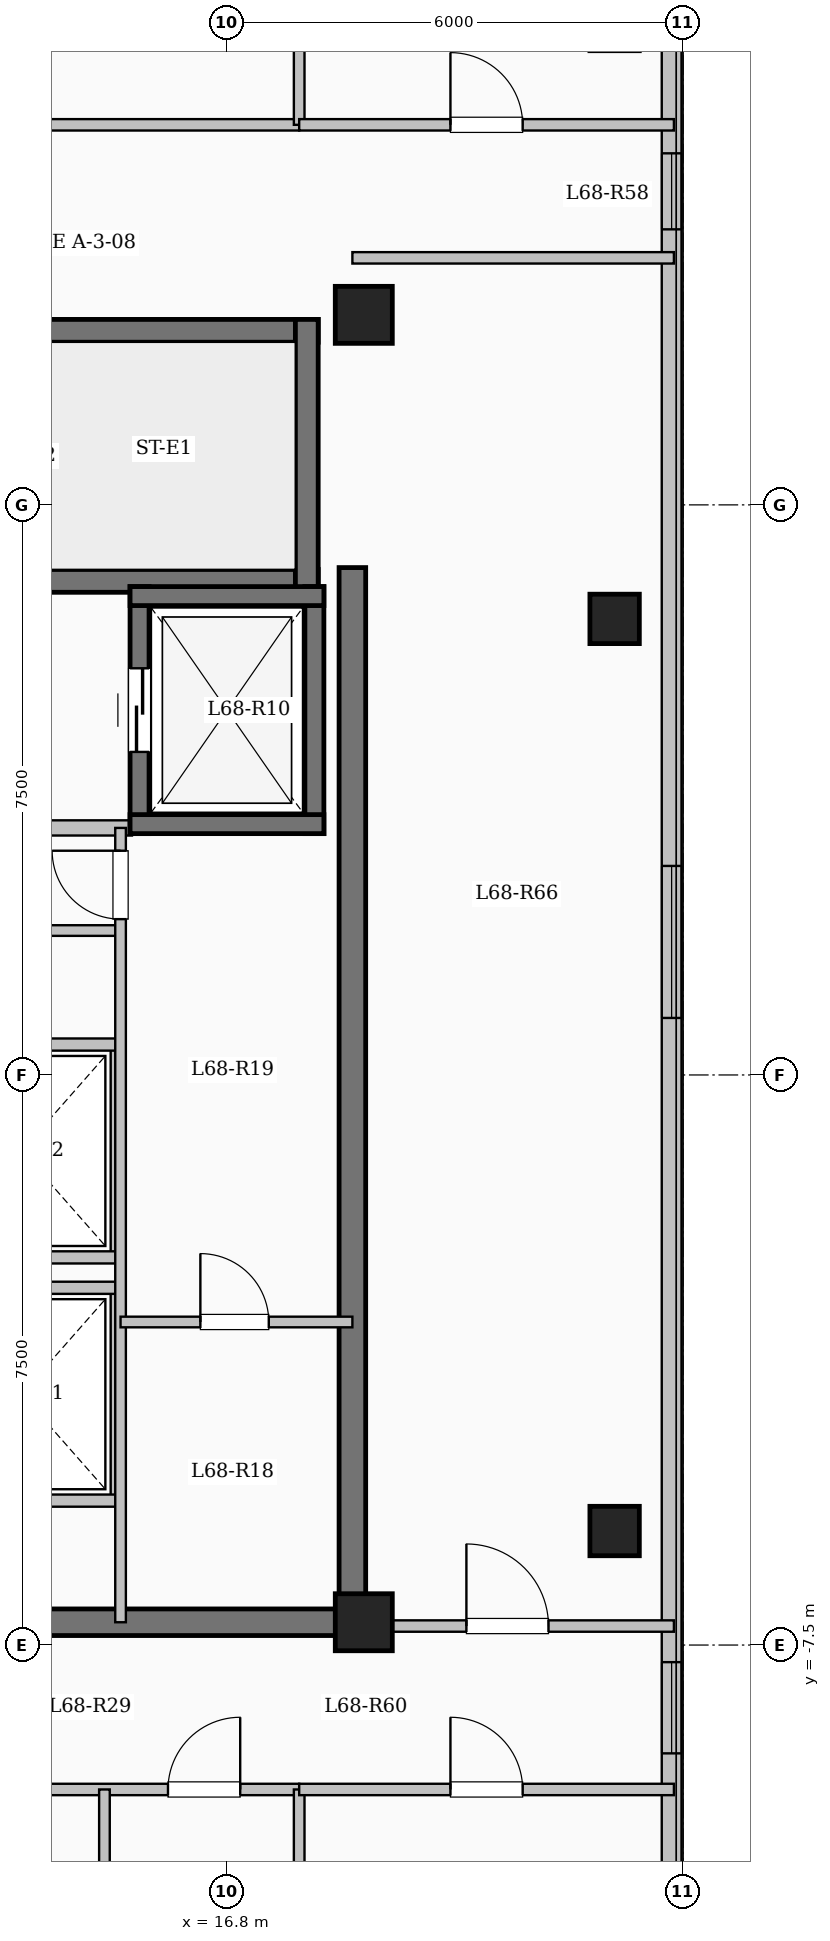
"""IFC4 building model, lengths in metres.
Left out: names, types, materials, properties, quantities, classifications, styles, units other than length and angle.
Written with IfcOpenShell. Run it as: python <this file> out.ifc"""

import sys

from ifc_helpers import new_model, si_unit, direction, frame, frame_2d, origin, origin_2d, place, context, subcontext, project, spatial, rectangle, extrude, element, fill, save


model = new_model("IFC4")
c1 = context("Model", 3, precision=1e-05, world=origin(), true_north=direction((0.0, 1.0)))
c2 = subcontext(c1, "Body", "Model", "MODEL_VIEW")
j1 = project(units=[si_unit("LENGTHUNIT", "METRE"), si_unit("PLANEANGLEUNIT", "RADIAN")], contexts=[c1])
p1 = place(None, origin())
s1 = spatial("IfcSite", under=j1, at=p1, CompositionType="ELEMENT")
p2 = place(p1, origin())
s2 = spatial("IfcBuilding", under=s1, at=p2, CompositionType="ELEMENT")
p3 = place(p2, frame((0.0, 0.0, 251.55)))
s3 = spatial("IfcBuildingStorey", under=s2, at=p3, CompositionType="ELEMENT", Elevation=251.55)
for number, where, z_axis, x_axis in (
    (1, (18.6, -7.2, 0.0), (0.0, 0.0, 1.0), (1.0, 0.0, 0.0)),
    (2, (18.6, 10.0, 0.0), (0.0, 0.0, 1.0), (1.0, 0.0, 0.0)),
):
    element("IfcColumn", number, at=place(p3, frame(where, z_axis=z_axis, x_axis=x_axis)), inside=s3, PredefinedType="COLUMN", context=c2, shape_type="SweptSolid", body=[
        extrude(rectangle(XDim=0.75, YDim=0.75, at=origin_2d()), origin(), (0.0, 0.0, 1.0), 3.35),
    ])
for number, where, z_axis, x_axis in (
    (3, (21.9, -6.0, 0.0), (0.0, 0.0, 1.0), (1.0, 0.0, 0.0)),
    (4, (21.9, 6.0, 0.0), (0.0, 0.0, 1.0), (1.0, 0.0, 0.0)),
):
    element("IfcColumn", number, at=place(p3, frame(where, z_axis=z_axis, x_axis=x_axis)), inside=s3, PredefinedType="COLUMN", context=c2, shape_type="SweptSolid", body=[
        extrude(rectangle(XDim=0.65, YDim=0.65, at=origin_2d()), origin(), (0.0, 0.0, 1.0), 3.35),
    ])
p4 = place(p3, frame((22.65, 17.55, 0.0), z_axis=(0.0, 0.0, 1.0), x_axis=(0.0, -1.0, 0.0)))
e5 = element("IfcWall", 5, at=p4, inside=s3, PredefinedType="SOLIDWALL", context=c2, shape_type="SweptSolid", body=[
    extrude(rectangle(XDim=35.1, YDim=0.26, at=frame_2d((17.55, 0.0))), origin(), (0.0, 0.0, 1.0), 3.1),
])
p5 = place(p4, frame((1.525, 0.0, 0.9)))
e6 = element("IfcOpeningElement", 6, at=p5, cuts=e5, PredefinedType="OPENING", context=c2, shape_type="SweptSolid", body=[
    extrude(rectangle(XDim=2.0, YDim=1.7, at=frame_2d((1.0, 0.85))), frame((0.0, 0.14, 0.0), z_axis=(0.0, -1.0, 0.0), x_axis=(1.0, 0.0, 0.0)), (0.0, 0.0, 1.0), 0.28),
])
p6 = place(p4, frame((5.425, 0.0, 0.95)))
e7 = element("IfcOpeningElement", 7, at=p6, cuts=e5, PredefinedType="OPENING", context=c2, shape_type="SweptSolid", body=[
    extrude(rectangle(XDim=1.0, YDim=1.5, at=frame_2d((0.5, 0.75))), frame((0.0, 0.14, 0.0), z_axis=(0.0, -1.0, 0.0), x_axis=(1.0, 0.0, 0.0)), (0.0, 0.0, 1.0), 0.28),
])
p7 = place(p4, frame((14.8, 0.0, 0.9)))
e8 = element("IfcOpeningElement", 8, at=p7, cuts=e5, PredefinedType="OPENING", context=c2, shape_type="SweptSolid", body=[
    extrude(rectangle(XDim=2.0, YDim=1.7, at=frame_2d((1.0, 0.85))), frame((0.0, 0.14, 0.0), z_axis=(0.0, -1.0, 0.0), x_axis=(1.0, 0.0, 0.0)), (0.0, 0.0, 1.0), 0.28),
])
p8 = place(p4, frame((25.275, 0.0, 0.95)))
e9 = element("IfcOpeningElement", 9, at=p8, cuts=e5, PredefinedType="OPENING", context=c2, shape_type="SweptSolid", body=[
    extrude(rectangle(XDim=1.2, YDim=1.5, at=frame_2d((0.6, 0.75))), frame((0.0, 0.14, 0.0), z_axis=(0.0, -1.0, 0.0), x_axis=(1.0, 0.0, 0.0)), (0.0, 0.0, 1.0), 0.28),
])
p9 = place(p4, frame((29.925, 0.0, 0.9)))
e10 = element("IfcOpeningElement", 10, at=p9, cuts=e5, PredefinedType="OPENING", context=c2, shape_type="SweptSolid", body=[
    extrude(rectangle(XDim=2.2, YDim=1.75, at=frame_2d((1.1, 0.875))), frame((0.0, 0.14, 0.0), z_axis=(0.0, -1.0, 0.0), x_axis=(1.0, 0.0, 0.0)), (0.0, 0.0, 1.0), 0.28),
])
p10 = place(p3, frame((10.0, 9.79, 0.0), z_axis=(0.0, 0.0, 1.0), x_axis=(1.0, 0.0, 0.0)))
e11 = element("IfcWall", 11, at=p10, inside=s3, PredefinedType="SHEAR", context=c2, shape_type="SweptSolid", body=[
    extrude(rectangle(XDim=8.0, YDim=0.3, at=frame_2d((4.0, 0.0))), origin(), (0.0, 0.0, 1.0), 3.35),
])
p11 = place(p3, frame((10.0, 6.5, 0.0), z_axis=(0.0, 0.0, 1.0), x_axis=(1.0, 0.0, 0.0)))
e12 = element("IfcWall", 12, at=p11, inside=s3, PredefinedType="SHEAR", context=c2, shape_type="SweptSolid", body=[
    extrude(rectangle(XDim=8.0, YDim=0.3, at=frame_2d((4.0, 0.0))), origin(), (0.0, 0.0, 1.0), 3.35),
])
p12 = place(p11, frame((0.55, 0.0, 0.0)))
e13 = element("IfcOpeningElement", 13, at=p12, cuts=e12, PredefinedType="OPENING", context=c2, shape_type="SweptSolid", body=[
    extrude(rectangle(XDim=1.0, YDim=2.15, at=frame_2d((0.5, 1.075))), frame((0.0, 0.16, 0.0), z_axis=(0.0, -1.0, 0.0), x_axis=(1.0, 0.0, 0.0)), (0.0, 0.0, 1.0), 0.32),
])
p13 = place(p3, frame((17.85, 6.35, 0.0), z_axis=(0.0, 0.0, 1.0), x_axis=(0.0, 1.0, 0.0)))
e14 = element("IfcWall", 14, at=p13, inside=s3, PredefinedType="SHEAR", context=c2, shape_type="SweptSolid", body=[
    extrude(rectangle(XDim=3.59, YDim=0.3, at=frame_2d((1.795, 0.0))), origin(), (0.0, 0.0, 1.0), 3.35),
])
p14 = place(p3, frame((10.15, 3.25, 0.0), z_axis=(0.0, 0.0, 1.0), x_axis=(1.0, 0.0, 0.0)))
e15 = element("IfcWall", 15, at=p14, inside=s3, PredefinedType="SOLIDWALL", context=c2, shape_type="SweptSolid", body=[
    extrude(rectangle(XDim=5.4, YDim=0.2, at=frame_2d((2.7, 0.0))), origin(), (0.0, 0.0, 1.0), 3.1),
])
p15 = place(p3, frame((15.65, 3.175, 0.0), z_axis=(0.0, 0.0, 1.0), x_axis=(0.0, 1.0, 0.0)))
e16 = element("IfcWall", 16, at=p15, inside=s3, PredefinedType="SHEAR", context=c2, shape_type="SweptSolid", body=[
    extrude(rectangle(XDim=3.25, YDim=0.25, at=frame_2d((1.625, 0.0))), origin(), (0.0, 0.0, 1.0), 3.35),
])
p16 = place(p15, frame((1.075, 0.0, 0.0)))
e17 = element("IfcOpeningElement", 17, at=p16, cuts=e16, PredefinedType="OPENING", context=c2, shape_type="SweptSolid", body=[
    extrude(rectangle(XDim=1.1, YDim=2.15, at=frame_2d((0.55, 1.075))), frame((0.0, 0.135, 0.0), z_axis=(0.0, -1.0, 0.0), x_axis=(1.0, 0.0, 0.0)), (0.0, 0.0, 1.0), 0.27),
])
p17 = place(p3, frame((17.95, 3.175, 0.0), z_axis=(0.0, 0.0, 1.0), x_axis=(0.0, 1.0, 0.0)))
e18 = element("IfcWall", 18, at=p17, inside=s3, PredefinedType="SHEAR", context=c2, shape_type="SweptSolid", body=[
    extrude(rectangle(XDim=3.25, YDim=0.25, at=frame_2d((1.625, 0.0))), origin(), (0.0, 0.0, 1.0), 3.35),
])
for number, where, z_axis, x_axis in (
    (19, (15.525, 3.3, 0.0), (0.0, 0.0, 1.0), (1.0, 0.0, 0.0)),
    (20, (15.525, 6.3, 0.0), (0.0, 0.0, 1.0), (1.0, 0.0, 0.0)),
):
    element("IfcWall", number, at=place(p3, frame(where, z_axis=z_axis, x_axis=x_axis)), inside=s3, PredefinedType="SHEAR", context=c2, shape_type="SweptSolid", body=[
        extrude(rectangle(XDim=2.55, YDim=0.25, at=frame_2d((1.275, 0.0))), origin(), (0.0, 0.0, 1.0), 3.35),
    ])
p18 = place(p3, frame((15.35, -5.6, 0.0), z_axis=(0.0, 0.0, 1.0), x_axis=(0.0, 1.0, 0.0)))
e21 = element("IfcWall", 21, at=p18, inside=s3, PredefinedType="SOLIDWALL", context=c2, shape_type="SweptSolid", body=[
    extrude(rectangle(XDim=2.8, YDim=0.16, at=frame_2d((1.4, 0.0))), origin(), (0.0, 0.0, 1.0), 3.1),
])
for number, where, z_axis, x_axis in (
    (22, (12.85, -5.6, 0.0), (0.0, 0.0, 1.0), (1.0, 0.0, 0.0)),
    (23, (12.85, -2.8, 0.0), (0.0, 0.0, 1.0), (1.0, 0.0, 0.0)),
):
    element("IfcWall", number, at=place(p3, frame(where, z_axis=z_axis, x_axis=x_axis)), inside=s3, PredefinedType="SOLIDWALL", context=c2, shape_type="SweptSolid", body=[
        extrude(rectangle(XDim=2.5, YDim=0.16, at=frame_2d((1.25, 0.0))), origin(), (0.0, 0.0, 1.0), 3.1),
    ])
p19 = place(p3, frame((15.35, -2.4, 0.0), z_axis=(0.0, 0.0, 1.0), x_axis=(0.0, 1.0, 0.0)))
e24 = element("IfcWall", 24, at=p19, inside=s3, PredefinedType="SOLIDWALL", context=c2, shape_type="SweptSolid", body=[
    extrude(rectangle(XDim=2.8, YDim=0.16, at=frame_2d((1.4, 0.0))), origin(), (0.0, 0.0, 1.0), 3.1),
])
for number, where, z_axis, x_axis in (
    (25, (12.85, -2.4, 0.0), (0.0, 0.0, 1.0), (1.0, 0.0, 0.0)),
    (26, (12.85, 0.4, 0.0), (0.0, 0.0, 1.0), (1.0, 0.0, 0.0)),
):
    element("IfcWall", number, at=place(p3, frame(where, z_axis=z_axis, x_axis=x_axis)), inside=s3, PredefinedType="SOLIDWALL", context=c2, shape_type="SweptSolid", body=[
        extrude(rectangle(XDim=2.5, YDim=0.16, at=frame_2d((1.25, 0.0))), origin(), (0.0, 0.0, 1.0), 3.1),
    ])
p20 = place(p3, frame((18.45, -7.375, 0.0), z_axis=(0.0, 0.0, 1.0), x_axis=(0.0, 1.0, 0.0)))
e27 = element("IfcWall", 27, at=p20, inside=s3, PredefinedType="SHEAR", context=c2, shape_type="SweptSolid", body=[
    extrude(rectangle(XDim=14.05, YDim=0.35, at=frame_2d((7.025, 0.0))), origin(), (0.0, 0.0, 1.0), 3.35),
])
p21 = place(p3, frame((12.625, -7.2, 0.0), z_axis=(0.0, 0.0, 1.0), x_axis=(1.0, 0.0, 0.0)))
e28 = element("IfcWall", 28, at=p21, inside=s3, PredefinedType="SHEAR", context=c2, shape_type="SweptSolid", body=[
    extrude(rectangle(XDim=6.0, YDim=0.35, at=frame_2d((3.0, 0.0))), origin(), (0.0, 0.0, 1.0), 3.35),
])
p22 = place(p3, frame((12.8, 1.9, 0.0), z_axis=(0.0, 0.0, 1.0), x_axis=(1.0, 0.0, 0.0)))
e29 = element("IfcWall", 29, at=p22, inside=s3, PredefinedType="PARTITIONING", context=c2, shape_type="SweptSolid", body=[
    extrude(rectangle(XDim=2.6, YDim=0.14, at=frame_2d((1.3, 0.0))), origin(), (0.0, 0.0, 1.0), 3.1),
])
p23 = place(p3, frame((15.4, -7.2, 0.0), z_axis=(0.0, 0.0, 1.0), x_axis=(0.0, 1.0, 0.0)))
e30 = element("IfcWall", 30, at=p23, inside=s3, PredefinedType="PARTITIONING", context=c2, shape_type="SweptSolid", body=[
    extrude(rectangle(XDim=10.45, YDim=0.14, at=frame_2d((5.225, 0.0))), origin(), (0.0, 0.0, 1.0), 3.1),
])
p24 = place(p23, frame((9.25, 0.0, 0.0)))
e31 = element("IfcOpeningElement", 31, at=p24, cuts=e30, PredefinedType="OPENING", context=c2, shape_type="SweptSolid", body=[
    extrude(rectangle(XDim=0.9, YDim=2.08, at=frame_2d((0.45, 1.04))), frame((0.0, 0.08, 0.0), z_axis=(0.0, -1.0, 0.0), x_axis=(1.0, 0.0, 0.0)), (0.0, 0.0, 1.0), 0.16),
])
p25 = place(p3, frame((15.4, -3.25, 0.0), z_axis=(0.0, 0.0, 1.0), x_axis=(1.0, 0.0, 0.0)))
e32 = element("IfcWall", 32, at=p25, inside=s3, PredefinedType="PARTITIONING", context=c2, shape_type="SweptSolid", body=[
    extrude(rectangle(XDim=3.05, YDim=0.14, at=frame_2d((1.525, 0.0))), origin(), (0.0, 0.0, 1.0), 3.1),
])
p26 = place(p25, frame((1.05, 0.0, 0.0)))
e33 = element("IfcOpeningElement", 33, at=p26, cuts=e32, PredefinedType="OPENING", context=c2, shape_type="SweptSolid", body=[
    extrude(rectangle(XDim=0.9, YDim=2.08, at=frame_2d((0.45, 1.04))), frame((0.0, 0.08, 0.0), z_axis=(0.0, -1.0, 0.0), x_axis=(1.0, 0.0, 0.0)), (0.0, 0.0, 1.0), 0.16),
])
p27 = place(p3, frame((3.85, 12.5, 0.0), z_axis=(0.0, 0.0, 1.0), x_axis=(1.0, 0.0, 0.0)))
e34 = element("IfcWall", 34, at=p27, inside=s3, PredefinedType="PARTITIONING", context=c2, shape_type="SweptSolid", body=[
    extrude(rectangle(XDim=13.9, YDim=0.15, at=frame_2d((6.95, 0.0))), origin(), (0.0, 0.0, 1.0), 3.1),
])
p28 = place(p27, frame((0.7, 0.0, 0.0)))
e35 = element("IfcOpeningElement", 35, at=p28, cuts=e34, PredefinedType="OPENING", context=c2, shape_type="SweptSolid", body=[
    extrude(rectangle(XDim=0.96, YDim=2.15, at=frame_2d((0.48, 1.075))), frame((0.0, 0.085, 0.0), z_axis=(0.0, -1.0, 0.0), x_axis=(1.0, 0.0, 0.0)), (0.0, 0.0, 1.0), 0.17),
])
p29 = place(p3, frame((8.55, -9.4, 0.0), z_axis=(0.0, 0.0, 1.0), x_axis=(1.0, 0.0, 0.0)))
e36 = element("IfcWall", 36, at=p29, inside=s3, PredefinedType="PARTITIONING", context=c2, shape_type="SweptSolid", body=[
    extrude(rectangle(XDim=9.2, YDim=0.15, at=frame_2d((4.6, 0.0))), origin(), (0.0, 0.0, 1.0), 3.1),
])
p30 = place(p29, frame((1.192, 0.0, 0.0)))
e37 = element("IfcOpeningElement", 37, at=p30, cuts=e36, PredefinedType="OPENING", context=c2, shape_type="SweptSolid", body=[
    extrude(rectangle(XDim=0.95, YDim=2.15, at=frame_2d((0.475, 1.075))), frame((0.0, 0.085, 0.0), z_axis=(0.0, -1.0, 0.0), x_axis=(1.0, 0.0, 0.0)), (0.0, 0.0, 1.0), 0.17),
])
p31 = place(p29, frame((4.516, 0.0, 0.0)))
e38 = element("IfcOpeningElement", 38, at=p31, cuts=e36, PredefinedType="OPENING", context=c2, shape_type="SweptSolid", body=[
    extrude(rectangle(XDim=0.95, YDim=2.15, at=frame_2d((0.475, 1.075))), frame((0.0, 0.085, 0.0), z_axis=(0.0, -1.0, 0.0), x_axis=(1.0, 0.0, 0.0)), (0.0, 0.0, 1.0), 0.17),
])
p32 = place(p29, frame((7.474, 0.0, 0.0)))
e39 = element("IfcOpeningElement", 39, at=p32, cuts=e36, PredefinedType="OPENING", context=c2, shape_type="SweptSolid", body=[
    extrude(rectangle(XDim=0.95, YDim=2.15, at=frame_2d((0.475, 1.075))), frame((0.0, 0.085, 0.0), z_axis=(0.0, -1.0, 0.0), x_axis=(1.0, 0.0, 0.0)), (0.0, 0.0, 1.0), 0.17),
])
p33 = place(p3, frame((15.188, -20.85, 0.0), z_axis=(0.0, 0.0, 1.0), x_axis=(0.0, 1.0, 0.0)))
e40 = element("IfcWall", 40, at=p33, inside=s3, PredefinedType="PARTITIONING", context=c2, shape_type="SweptSolid", body=[
    extrude(rectangle(XDim=11.45, YDim=0.14, at=frame_2d((5.725, 0.0))), origin(), (0.0, 0.0, 1.0), 2.685),
])
p34 = place(p3, frame((18.45, -7.25, 0.0), z_axis=(0.0, 0.0, 1.0), x_axis=(1.0, 0.0, 0.0)))
e41 = element("IfcWall", 41, at=p34, inside=s3, PredefinedType="PARTITIONING", context=c2, shape_type="SweptSolid", body=[
    extrude(rectangle(XDim=4.23, YDim=0.15, at=frame_2d((2.115, 0.0))), origin(), (0.0, 0.0, 1.0), 3.1),
])
p35 = place(p34, frame((1.5, 0.0, 0.0)))
e42 = element("IfcOpeningElement", 42, at=p35, cuts=e41, PredefinedType="OPENING", context=c2, shape_type="SweptSolid", body=[
    extrude(rectangle(XDim=1.08, YDim=2.15, at=frame_2d((0.54, 1.075))), frame((0.0, 0.085, 0.0), z_axis=(0.0, -1.0, 0.0), x_axis=(1.0, 0.0, 0.0)), (0.0, 0.0, 1.0), 0.17),
])
p36 = place(p3, frame((18.45, 10.75, 0.0), z_axis=(0.0, 0.0, 1.0), x_axis=(1.0, 0.0, 0.0)))
e43 = element("IfcWall", 43, at=p36, inside=s3, PredefinedType="PARTITIONING", context=c2, shape_type="SweptSolid", body=[
    extrude(rectangle(XDim=4.23, YDim=0.15, at=frame_2d((2.115, 0.0))), origin(), (0.0, 0.0, 1.0), 3.1),
])
p37 = place(p3, frame((17.75, -17.55, 0.0), z_axis=(0.0, 0.0, 1.0), x_axis=(0.0, 1.0, 0.0)))
e44 = element("IfcWall", 44, at=p37, inside=s3, PredefinedType="PARTITIONING", context=c2, shape_type="SweptSolid", body=[
    extrude(rectangle(XDim=8.15, YDim=0.14, at=frame_2d((4.075, 0.0))), origin(), (0.0, 0.0, 1.0), 3.1),
])
p38 = place(p3, frame((17.75, 12.5, 0.0), z_axis=(0.0, 0.0, 1.0), x_axis=(0.0, 1.0, 0.0)))
e45 = element("IfcWall", 45, at=p38, inside=s3, PredefinedType="PARTITIONING", context=c2, shape_type="SweptSolid", body=[
    extrude(rectangle(XDim=5.05, YDim=0.14, at=frame_2d((2.525, 0.0))), origin(), (0.0, 0.0, 1.0), 3.1),
])
p39 = place(p3, frame((17.75, 12.5, 0.0), z_axis=(0.0, 0.0, 1.0), x_axis=(1.0, 0.0, 0.0)))
e46 = element("IfcWall", 46, at=p39, inside=s3, PredefinedType="PARTITIONING", context=c2, shape_type="SweptSolid", body=[
    extrude(rectangle(XDim=4.93, YDim=0.15, at=frame_2d((2.465, 0.0))), origin(), (0.0, 0.0, 1.0), 3.1),
])
p40 = place(p39, frame((1.99, 0.0, 0.0)))
e47 = element("IfcOpeningElement", 47, at=p40, cuts=e46, PredefinedType="OPENING", context=c2, shape_type="SweptSolid", body=[
    extrude(rectangle(XDim=0.95, YDim=2.15, at=frame_2d((0.475, 1.075))), frame((0.0, 0.085, 0.0), z_axis=(0.0, -1.0, 0.0), x_axis=(1.0, 0.0, 0.0)), (0.0, 0.0, 1.0), 0.17),
])
p41 = place(p3, frame((17.75, -9.4, 0.0), z_axis=(0.0, 0.0, 1.0), x_axis=(1.0, 0.0, 0.0)))
e48 = element("IfcWall", 48, at=p41, inside=s3, PredefinedType="PARTITIONING", context=c2, shape_type="SweptSolid", body=[
    extrude(rectangle(XDim=4.93, YDim=0.15, at=frame_2d((2.465, 0.0))), origin(), (0.0, 0.0, 1.0), 3.1),
])
p42 = place(p41, frame((1.99, 0.0, 0.0)))
e49 = element("IfcOpeningElement", 49, at=p42, cuts=e48, PredefinedType="OPENING", context=c2, shape_type="SweptSolid", body=[
    extrude(rectangle(XDim=0.95, YDim=2.15, at=frame_2d((0.475, 1.075))), frame((0.0, 0.085, 0.0), z_axis=(0.0, -1.0, 0.0), x_axis=(1.0, 0.0, 0.0)), (0.0, 0.0, 1.0), 0.17),
])
p43 = place(p6, origin())
e50 = element("IfcWindow", 50, at=p43, inside=s3, PartitioningType="SINGLE_PANEL", PredefinedType="WINDOW", context=c2, shape_type="SweptSolid", body=[
    extrude(rectangle(XDim=1.0, YDim=1.5, at=frame_2d((0.5, 0.75))), frame((0.0, 0.03, 0.0), z_axis=(0.0, -1.0, 0.0), x_axis=(1.0, 0.0, 0.0)), (0.0, 0.0, 1.0), 0.06),
])
fill(e7, e50)
p44 = place(p7, origin())
e51 = element("IfcWindow", 51, at=p44, inside=s3, PartitioningType="SINGLE_PANEL", PredefinedType="WINDOW", context=c2, shape_type="SweptSolid", body=[
    extrude(rectangle(XDim=2.0, YDim=1.7, at=frame_2d((1.0, 0.85))), frame((0.0, 0.03, 0.0), z_axis=(0.0, -1.0, 0.0), x_axis=(1.0, 0.0, 0.0)), (0.0, 0.0, 1.0), 0.06),
])
fill(e8, e51)
p45 = place(p8, origin())
e52 = element("IfcWindow", 52, at=p45, inside=s3, PartitioningType="SINGLE_PANEL", PredefinedType="WINDOW", context=c2, shape_type="SweptSolid", body=[
    extrude(rectangle(XDim=1.2, YDim=1.5, at=frame_2d((0.6, 0.75))), frame((0.0, 0.03, 0.0), z_axis=(0.0, -1.0, 0.0), x_axis=(1.0, 0.0, 0.0)), (0.0, 0.0, 1.0), 0.06),
])
fill(e9, e52)
p46 = place(p16, origin())
e53 = element("IfcDoor", 53, at=p46, inside=s3, OperationType="SLIDING_TO_LEFT", PredefinedType="DOOR", context=c2, shape_type="SweptSolid", body=[
    extrude(rectangle(XDim=1.1, YDim=2.15, at=frame_2d((0.55, 1.075))), frame((0.0, 0.025, 0.0), z_axis=(0.0, -1.0, 0.0), x_axis=(1.0, 0.0, 0.0)), (0.0, 0.0, 1.0), 0.05),
])
fill(e17, e53)
p47 = place(p24, origin())
e54 = element("IfcDoor", 54, at=p47, inside=s3, OperationType="SINGLE_SWING_RIGHT", PredefinedType="DOOR", context=c2, shape_type="SweptSolid", body=[
    extrude(rectangle(XDim=0.9, YDim=2.08, at=frame_2d((0.45, 1.04))), frame((0.0, 0.025, 0.0), z_axis=(0.0, -1.0, 0.0), x_axis=(1.0, 0.0, 0.0)), (0.0, 0.0, 1.0), 0.05),
])
fill(e31, e54)
p48 = place(p26, origin())
e55 = element("IfcDoor", 55, at=p48, inside=s3, OperationType="SINGLE_SWING_LEFT", PredefinedType="DOOR", context=c2, shape_type="SweptSolid", body=[
    extrude(rectangle(XDim=0.9, YDim=2.08, at=frame_2d((0.45, 1.04))), frame((0.0, 0.025, 0.0), z_axis=(0.0, -1.0, 0.0), x_axis=(1.0, 0.0, 0.0)), (0.0, 0.0, 1.0), 0.05),
])
fill(e33, e55)
p49 = place(p32, origin())
e56 = element("IfcDoor", 56, at=p49, inside=s3, OperationType="SINGLE_SWING_RIGHT", PredefinedType="DOOR", context=c2, shape_type="SweptSolid", body=[
    extrude(rectangle(XDim=0.95, YDim=2.15, at=frame_2d((0.475, 1.075))), frame((0.0, 0.025, 0.0), z_axis=(0.0, -1.0, 0.0), x_axis=(1.0, 0.0, 0.0)), (0.0, 0.0, 1.0), 0.05),
])
fill(e39, e56)
p50 = place(p40, origin())
e57 = element("IfcDoor", 57, at=p50, inside=s3, OperationType="SINGLE_SWING_LEFT", PredefinedType="DOOR", context=c2, shape_type="SweptSolid", body=[
    extrude(rectangle(XDim=0.95, YDim=2.15, at=frame_2d((0.475, 1.075))), frame((0.0, 0.025, 0.0), z_axis=(0.0, -1.0, 0.0), x_axis=(1.0, 0.0, 0.0)), (0.0, 0.0, 1.0), 0.05),
])
fill(e47, e57)
p51 = place(p42, origin())
e58 = element("IfcDoor", 58, at=p51, inside=s3, OperationType="SINGLE_SWING_LEFT", PredefinedType="DOOR", context=c2, shape_type="SweptSolid", body=[
    extrude(rectangle(XDim=0.95, YDim=2.15, at=frame_2d((0.475, 1.075))), frame((0.0, 0.025, 0.0), z_axis=(0.0, -1.0, 0.0), x_axis=(1.0, 0.0, 0.0)), (0.0, 0.0, 1.0), 0.05),
])
fill(e49, e58)
p52 = place(p35, origin())
e59 = element("IfcDoor", 59, at=p52, inside=s3, OperationType="SINGLE_SWING_LEFT", PredefinedType="DOOR", context=c2, shape_type="SweptSolid", body=[
    extrude(rectangle(XDim=1.08, YDim=2.15, at=frame_2d((0.54, 1.075))), frame((0.0, 0.025, 0.0), z_axis=(0.0, -1.0, 0.0), x_axis=(1.0, 0.0, 0.0)), (0.0, 0.0, 1.0), 0.05),
])
fill(e42, e59)
save(model, sys.argv[1])
